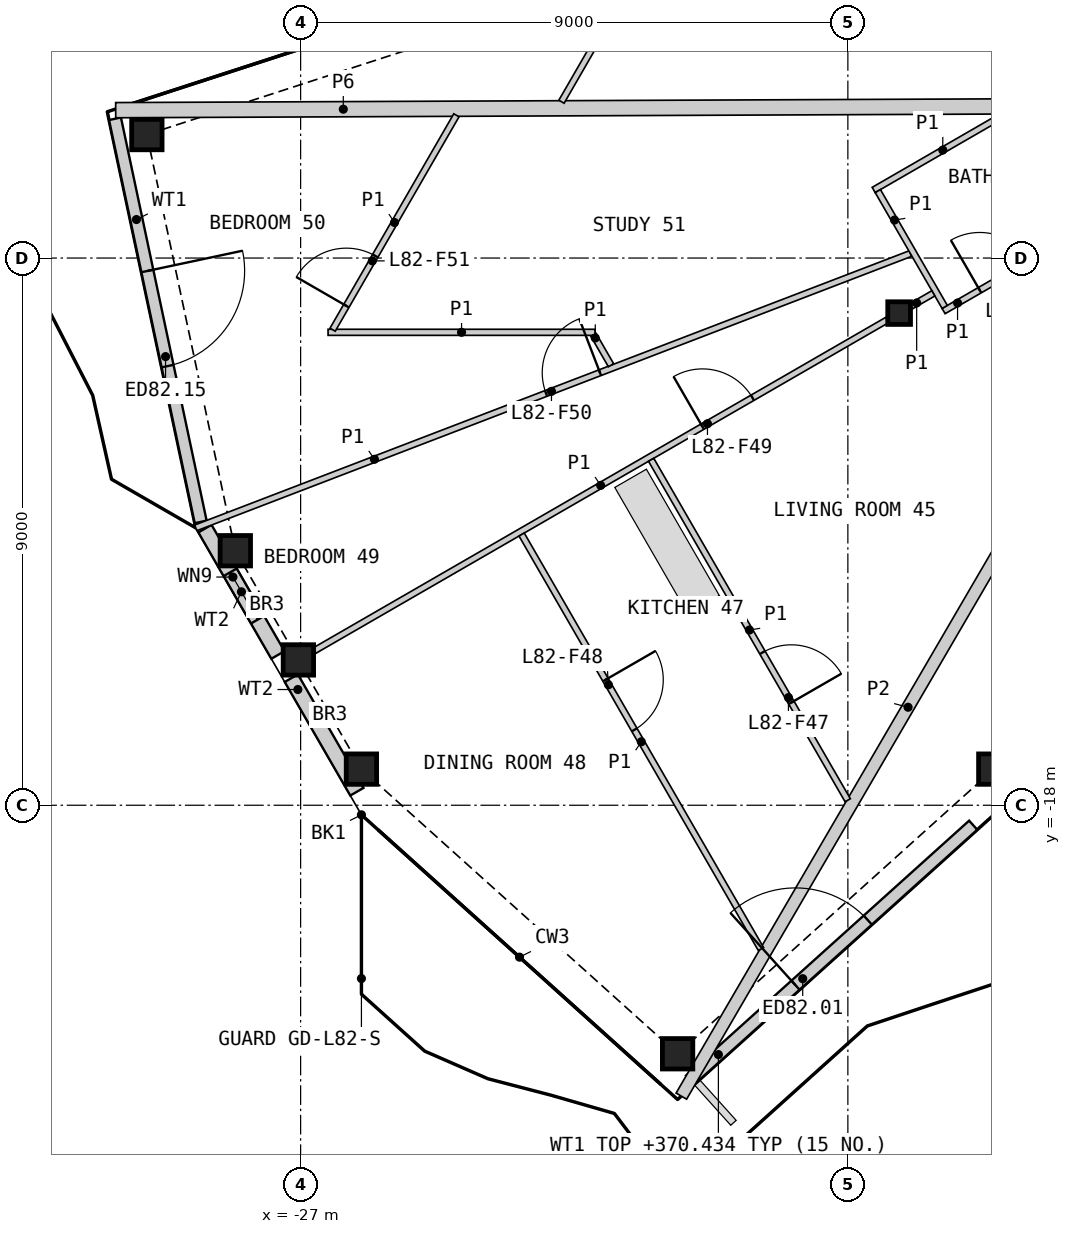
"""IFC4 building model, lengths in metres.
Left out: names, types, materials, properties, quantities, classifications, styles, units other than length and angle.
Written with IfcOpenShell. Run it as: python <this file> out.ifc"""

import sys

from ifc_helpers import new_model, si_unit, direction, frame, frame_2d, origin, origin_2d, place, context, subcontext, project, spatial, rectangle, hollow_rectangle, i_section, extrude, element, fill, save


model = new_model("IFC4")
c1 = context("Model", 3, precision=1e-05, world=origin(), true_north=direction((0.0, 1.0)))
c2 = subcontext(c1, "Body", "Model", "MODEL_VIEW")
j1 = project(units=[si_unit("LENGTHUNIT", "METRE"), si_unit("PLANEANGLEUNIT", "RADIAN")], contexts=[c1])
p1 = place(None, origin())
s1 = spatial("IfcSite", under=j1, at=p1, CompositionType="ELEMENT")
p2 = place(p1, origin())
s2 = spatial("IfcBuilding", under=s1, at=p2, CompositionType="ELEMENT")
p3 = place(p2, frame((0.0, 0.0, 367.8)))
s3 = spatial("IfcBuildingStorey", under=s2, at=p3, CompositionType="ELEMENT", Elevation=367.8)
for number, where, z_axis, x_axis in (
    (1, (-26.0, -17.406, 0.0), (0.0, 0.0, 1.0), (1.0, 0.0, 0.0)),
    (2, (-20.8, -22.088, 0.0), (0.0, 0.0, 1.0), (1.0, 0.0, 0.0)),
    (3, (-15.6, -17.406, 0.0), (0.0, 0.0, 1.0), (1.0, 0.0, 0.0)),
    (4, (-29.529, -6.969, 0.0), (0.0, 0.0, 1.0), (1.0, 0.0, 0.0)),
    (5, (-28.074, -13.814, 0.0), (0.0, 0.0, 1.0), (1.0, 0.0, 0.0)),
    (6, (-27.037, -15.61, 0.0), (0.0, 0.0, 1.0), (1.0, 0.0, 0.0)),
):
    element("IfcColumn", number, at=place(p3, frame(where, z_axis=z_axis, x_axis=x_axis)), inside=s3, PredefinedType="COLUMN", context=c2, shape_type="SweptSolid", body=[
        extrude(hollow_rectangle(XDim=0.5, YDim=0.5, WallThickness=0.03, at=origin_2d()), origin(), (0.0, 0.0, 1.0), 3.4),
    ])
p4 = place(p3, frame((-17.157, -9.906, 0.0), z_axis=(0.0, 0.0, 1.0), x_axis=(1.0, 0.0, 0.0)))
e7 = element("IfcColumn", 7, at=p4, inside=s3, PredefinedType="COLUMN", context=c2, shape_type="SweptSolid", body=[
    extrude(i_section(OverallWidth=0.374, OverallDepth=0.372, WebThickness=0.016, FlangeThickness=0.026, at=origin_2d()), origin(), (0.0, 0.0, 1.0), 3.4),
])
p5 = place(p3, frame((-20.595, -22.52, 0.0), z_axis=(0.0, 0.0, 1.0), x_axis=(0.743137181878, 0.669139095339, 0.0)))
e8 = element("IfcWall", 8, at=p5, inside=s3, PredefinedType="SOLIDWALL", context=c2, shape_type="SweptSolid", body=[
    extrude(rectangle(XDim=6.265, YDim=0.2, at=frame_2d((3.133, 0.0))), origin(), (0.0, 0.0, 1.0), 2.634),
])
p6 = place(p5, frame((2.333, 0.0, 0.0)))
e9 = element("IfcOpeningElement", 9, at=p6, cuts=e8, PredefinedType="OPENING", context=c2, shape_type="SweptSolid", body=[
    extrude(rectangle(XDim=1.6, YDim=2.25, at=frame_2d((0.8, 1.125))), frame((0.0, 0.11, 0.0), z_axis=(0.0, -1.0, 0.0), x_axis=(1.0, 0.0, 0.0)), (0.0, 0.0, 1.0), 0.22),
])
p7 = place(p3, frame((-30.053, -6.709, 0.0), z_axis=(0.0, 0.0, 1.0), x_axis=(0.207917767315, -0.978146309115, 0.0)))
e10 = element("IfcWall", 10, at=p7, inside=s3, PredefinedType="SOLIDWALL", context=c2, shape_type="SweptSolid", body=[
    extrude(rectangle(XDim=6.779, YDim=0.2, at=frame_2d((3.389, 0.0))), origin(), (0.0, 0.0, 1.0), 2.634),
])
p8 = place(p7, frame((2.559, 0.0, 0.0)))
e11 = element("IfcOpeningElement", 11, at=p8, cuts=e10, PredefinedType="OPENING", context=c2, shape_type="SweptSolid", body=[
    extrude(rectangle(XDim=1.6, YDim=2.25, at=frame_2d((0.8, 1.125))), frame((0.0, 0.11, 0.0), z_axis=(0.0, -1.0, 0.0), x_axis=(1.0, 0.0, 0.0)), (0.0, 0.0, 1.0), 0.22),
])
p9 = place(p3, frame((-28.573, -13.45, 0.0), z_axis=(0.0, 0.0, 1.0), x_axis=(0.499969057507, -0.866043267704, 0.0)))
e12 = element("IfcWall", 12, at=p9, inside=s3, PredefinedType="SOLIDWALL", context=c2, shape_type="SweptSolid", body=[
    extrude(rectangle(XDim=2.4, YDim=0.25, at=frame_2d((1.2, 0.0))), origin(), (0.0, 0.0, 1.0), 2.634),
])
p10 = place(p9, frame((0.83, 0.0, 0.6)))
e13 = element("IfcOpeningElement", 13, at=p10, cuts=e12, PredefinedType="OPENING", context=c2, shape_type="SweptSolid", body=[
    extrude(rectangle(XDim=0.9, YDim=1.8, at=frame_2d((0.45, 0.9))), frame((0.0, 0.135, 0.0), z_axis=(0.0, -1.0, 0.0), x_axis=(1.0, 0.0, 0.0)), (0.0, 0.0, 1.0), 0.27),
])
p11 = place(p3, frame((-27.153, -15.91, 0.0), z_axis=(0.0, 0.0, 1.0), x_axis=(0.50000982419, -0.866019731711, 0.0)))
e14 = element("IfcWall", 14, at=p11, inside=s3, PredefinedType="SOLIDWALL", context=c2, shape_type="SweptSolid", body=[
    extrude(rectangle(XDim=2.157, YDim=0.25, at=frame_2d((1.079, 0.0))), origin(), (0.0, 0.0, 1.0), 2.634),
])
p12 = place(p3, frame((-30.041, -6.568, 0.0), z_axis=(0.0, 0.0, 1.0), x_axis=(0.999991150877, 0.004206918925, 0.0)))
e15 = element("IfcWall", 15, at=p12, inside=s3, PredefinedType="PARTITIONING", context=c2, shape_type="SweptSolid", body=[
    extrude(rectangle(XDim=14.973, YDim=0.25, at=frame_2d((7.486, 0.0))), origin(), (0.0, 0.0, 1.0), 2.33),
])
p13 = place(p3, frame((-20.739, -22.784, 0.0), z_axis=(0.0, 0.0, 1.0), x_axis=(0.50362599185, 0.863921790635, 0.0)))
e16 = element("IfcWall", 16, at=p13, inside=s3, PredefinedType="PARTITIONING", context=c2, shape_type="SweptSolid", body=[
    extrude(rectangle(XDim=14.807, YDim=0.2, at=frame_2d((7.404, 0.0))), origin(), (0.0, 0.0, 1.0), 2.33),
])
p14 = place(p3, frame((-28.725, -13.438, 0.0), z_axis=(0.0, 0.0, 1.0), x_axis=(0.933580312145, 0.358368247444, 0.0)))
e17 = element("IfcWall", 17, at=p14, inside=s3, PredefinedType="PARTITIONING", context=c2, shape_type="SweptSolid", body=[
    extrude(rectangle(XDim=12.59, YDim=0.1, at=frame_2d((6.295, 0.0))), origin(), (0.0, 0.0, 1.0), 2.33),
])
p15 = place(p14, frame((6.171, 0.0, 0.0)))
e18 = element("IfcOpeningElement", 18, at=p15, cuts=e17, PredefinedType="OPENING", context=c2, shape_type="SweptSolid", body=[
    extrude(rectangle(XDim=0.95, YDim=2.1, at=frame_2d((0.475, 1.05))), frame((0.0, 0.06, 0.0), z_axis=(0.0, -1.0, 0.0), x_axis=(1.0, 0.0, 0.0)), (0.0, 0.0, 1.0), 0.12),
])
p16 = place(p3, frame((-26.777, -15.46, 0.0), z_axis=(0.0, 0.0, 1.0), x_axis=(0.866019680922, 0.500009912158, 0.0)))
e19 = element("IfcWall", 19, at=p16, inside=s3, PredefinedType="PARTITIONING", context=c2, shape_type="SweptSolid", body=[
    extrude(rectangle(XDim=10.881, YDim=0.1, at=frame_2d((5.44, 0.0))), origin(), (0.0, 0.0, 1.0), 2.33),
])
p17 = place(p16, frame((7.373, 0.0, 0.0)))
e20 = element("IfcOpeningElement", 20, at=p17, cuts=e19, PredefinedType="OPENING", context=c2, shape_type="SweptSolid", body=[
    extrude(rectangle(XDim=0.95, YDim=2.1, at=frame_2d((0.475, 1.05))), frame((0.0, 0.06, 0.0), z_axis=(0.0, -1.0, 0.0), x_axis=(1.0, 0.0, 0.0)), (0.0, 0.0, 1.0), 0.12),
])
p18 = place(p3, frame((-23.365, -13.548, 0.0), z_axis=(0.0, 0.0, 1.0), x_axis=(0.500011483804, -0.866018773506, 0.0)))
e21 = element("IfcWall", 21, at=p18, inside=s3, PredefinedType="PARTITIONING", context=c2, shape_type="SweptSolid", body=[
    extrude(rectangle(XDim=7.872, YDim=0.1, at=frame_2d((3.936, 0.0))), origin(), (0.0, 0.0, 1.0), 2.33),
])
p19 = place(p18, frame((2.759, 0.0, 0.0)))
e22 = element("IfcOpeningElement", 22, at=p19, cuts=e21, PredefinedType="OPENING", context=c2, shape_type="SweptSolid", body=[
    extrude(rectangle(XDim=0.95, YDim=2.1, at=frame_2d((0.475, 1.05))), frame((0.0, 0.06, 0.0), z_axis=(0.0, -1.0, 0.0), x_axis=(1.0, 0.0, 0.0)), (0.0, 0.0, 1.0), 0.12),
])
p20 = place(p3, frame((-22.71, -6.429, 0.0), z_axis=(0.0, 0.0, 1.0), x_axis=(0.499984737558, 0.86603421538, 0.0)))
e23 = element("IfcWall", 23, at=p20, inside=s3, PredefinedType="PARTITIONING", context=c2, shape_type="SweptSolid", body=[
    extrude(rectangle(XDim=6.473, YDim=0.1, at=frame_2d((3.236, 0.0))), origin(), (0.0, 0.0, 1.0), 2.33),
])
p21 = place(p20, frame((3.063, 0.0, 0.0)))
e24 = element("IfcOpeningElement", 24, at=p21, cuts=e23, PredefinedType="OPENING", context=c2, shape_type="SweptSolid", body=[
    extrude(rectangle(XDim=0.95, YDim=2.1, at=frame_2d((0.475, 1.05))), frame((0.0, 0.06, 0.0), z_axis=(0.0, -1.0, 0.0), x_axis=(1.0, 0.0, 0.0)), (0.0, 0.0, 1.0), 0.12),
])
p22 = place(p3, frame((-21.235, -12.318, 0.0), z_axis=(0.0, 0.0, 1.0), x_axis=(0.500008973052, -0.866020223129, 0.0)))
e25 = element("IfcWall", 25, at=p22, inside=s3, PredefinedType="PARTITIONING", context=c2, shape_type="SweptSolid", body=[
    extrude(rectangle(XDim=6.466, YDim=0.1, at=frame_2d((3.233, 0.0))), origin(), (0.0, 0.0, 1.0), 2.33),
])
p23 = place(p22, frame((3.661, 0.0, 0.0)))
e26 = element("IfcOpeningElement", 26, at=p23, cuts=e25, PredefinedType="OPENING", context=c2, shape_type="SweptSolid", body=[
    extrude(rectangle(XDim=0.95, YDim=2.1, at=frame_2d((0.475, 1.05))), frame((0.0, 0.06, 0.0), z_axis=(0.0, -1.0, 0.0), x_axis=(1.0, 0.0, 0.0)), (0.0, 0.0, 1.0), 0.12),
])
p24 = place(p3, frame((-26.549, -10.222, 0.0), z_axis=(0.0, 0.0, 1.0), x_axis=(1.0, 0.0, 0.0)))
e27 = element("IfcWall", 27, at=p24, inside=s3, PredefinedType="PARTITIONING", context=c2, shape_type="SweptSolid", body=[
    extrude(rectangle(XDim=4.391, YDim=0.1, at=frame_2d((2.195, 0.0))), origin(), (0.0, 0.0, 1.0), 2.33),
])
p25 = place(p3, frame((-26.474, -10.178, 0.0), z_axis=(0.0, 0.0, 1.0), x_axis=(0.499995835917, 0.866027807905, 0.0)))
e28 = element("IfcWall", 28, at=p25, inside=s3, PredefinedType="PARTITIONING", context=c2, shape_type="SweptSolid", body=[
    extrude(rectangle(XDim=4.071, YDim=0.1, at=frame_2d((2.036, 0.0))), origin(), (0.0, 0.0, 1.0), 2.33),
])
p26 = place(p25, frame((0.452, 0.0, 0.0)))
e29 = element("IfcOpeningElement", 29, at=p26, cuts=e28, PredefinedType="OPENING", context=c2, shape_type="SweptSolid", body=[
    extrude(rectangle(XDim=0.95, YDim=2.1, at=frame_2d((0.475, 1.05))), frame((0.0, 0.06, 0.0), z_axis=(0.0, -1.0, 0.0), x_axis=(1.0, 0.0, 0.0)), (0.0, 0.0, 1.0), 0.12),
])
p27 = place(p3, frame((-17.575, -7.881, 0.0), z_axis=(0.0, 0.0, 1.0), x_axis=(0.866013657776, 0.500020344131, 0.0)))
e30 = element("IfcWall", 30, at=p27, inside=s3, PredefinedType="PARTITIONING", context=c2, shape_type="SweptSolid", body=[
    extrude(rectangle(XDim=2.625, YDim=0.1, at=frame_2d((1.312, 0.0))), origin(), (0.0, 0.0, 1.0), 2.33),
])
p28 = place(p3, frame((-16.426, -9.872, 0.0), z_axis=(0.0, 0.0, 1.0), x_axis=(0.866029095148, 0.499993606316, 0.0)))
e31 = element("IfcWall", 31, at=p28, inside=s3, PredefinedType="PARTITIONING", context=c2, shape_type="SweptSolid", body=[
    extrude(rectangle(XDim=2.65, YDim=0.1, at=frame_2d((1.325, 0.0))), origin(), (0.0, 0.0, 1.0), 2.33),
])
p29 = place(p28, frame((0.686, 0.0, 0.0)))
e32 = element("IfcOpeningElement", 32, at=p29, cuts=e31, PredefinedType="OPENING", context=c2, shape_type="SweptSolid", body=[
    extrude(rectangle(XDim=0.95, YDim=2.1, at=frame_2d((0.475, 1.05))), frame((0.0, 0.06, 0.0), z_axis=(0.0, -1.0, 0.0), x_axis=(1.0, 0.0, 0.0)), (0.0, 0.0, 1.0), 0.12),
])
p30 = place(p3, frame((-17.507, -7.899, 0.0), z_axis=(0.0, 0.0, 1.0), x_axis=(0.499946605688, -0.86605622881, 0.0)))
e33 = element("IfcWall", 33, at=p30, inside=s3, PredefinedType="PARTITIONING", context=c2, shape_type="SweptSolid", body=[
    extrude(rectangle(XDim=2.2, YDim=0.1, at=frame_2d((1.1, 0.0))), origin(), (0.0, 0.0, 1.0), 2.33),
])
p31 = place(p3, frame((-22.183, -10.265, 0.0), z_axis=(0.0, 0.0, 1.0), x_axis=(0.500016142392, -0.86601608377, 0.0)))
e34 = element("IfcWall", 34, at=p31, inside=s3, PredefinedType="PARTITIONING", context=c2, shape_type="SweptSolid", body=[
    extrude(rectangle(XDim=0.576, YDim=0.1, at=frame_2d((0.288, 0.0))), origin(), (0.0, 0.0, 1.0), 2.33),
])
p32 = place(p3, frame((-16.96, -9.792, 0.0), z_axis=(0.0, 0.0, 1.0), x_axis=(0.866137484628, 0.499805820016, 0.0)))
e35 = element("IfcWall", 35, at=p32, inside=s3, PredefinedType="PARTITIONING", context=c2, shape_type="SweptSolid", body=[
    extrude(rectangle(XDim=0.423, YDim=0.1, at=frame_2d((0.211, 0.0))), origin(), (0.0, 0.0, 1.0), 2.33),
])
p33 = place(p6, origin())
e36 = element("IfcDoor", 36, at=p33, inside=s3, OperationType="DOUBLE_DOOR_SINGLE_SWING", PredefinedType="DOOR", context=c2, shape_type="SweptSolid", body=[
    extrude(rectangle(XDim=1.6, YDim=2.25, at=frame_2d((0.8, 1.125))), frame((0.0, 0.025, 0.0), z_axis=(0.0, -1.0, 0.0), x_axis=(1.0, 0.0, 0.0)), (0.0, 0.0, 1.0), 0.05),
])
fill(e9, e36)
p34 = place(p8, origin())
e37 = element("IfcDoor", 37, at=p34, inside=s3, OperationType="DOUBLE_DOOR_SINGLE_SWING", PredefinedType="DOOR", context=c2, shape_type="SweptSolid", body=[
    extrude(rectangle(XDim=1.6, YDim=2.25, at=frame_2d((0.8, 1.125))), frame((0.0, 0.025, 0.0), z_axis=(0.0, -1.0, 0.0), x_axis=(1.0, 0.0, 0.0)), (0.0, 0.0, 1.0), 0.05),
])
fill(e11, e37)
p35 = place(p10, origin())
e38 = element("IfcWindow", 38, at=p35, inside=s3, PartitioningType="SINGLE_PANEL", PredefinedType="WINDOW", context=c2, shape_type="SweptSolid", body=[
    extrude(rectangle(XDim=0.9, YDim=1.8, at=frame_2d((0.45, 0.9))), frame((0.0, 0.03, 0.0), z_axis=(0.0, -1.0, 0.0), x_axis=(1.0, 0.0, 0.0)), (0.0, 0.0, 1.0), 0.06),
])
fill(e13, e38)
p36 = place(p29, origin())
e39 = element("IfcDoor", 39, at=p36, inside=s3, OperationType="SINGLE_SWING_LEFT", PredefinedType="DOOR", context=c2, shape_type="SweptSolid", body=[
    extrude(rectangle(XDim=0.95, YDim=2.1, at=frame_2d((0.475, 1.05))), frame((0.0, 0.025, 0.0), z_axis=(0.0, -1.0, 0.0), x_axis=(1.0, 0.0, 0.0)), (0.0, 0.0, 1.0), 0.05),
])
fill(e32, e39)
p37 = place(p23, origin())
e40 = element("IfcDoor", 40, at=p37, inside=s3, OperationType="SINGLE_SWING_RIGHT", PredefinedType="DOOR", context=c2, shape_type="SweptSolid", body=[
    extrude(rectangle(XDim=0.95, YDim=2.1, at=frame_2d((0.475, 1.05))), frame((0.0, 0.025, 0.0), z_axis=(0.0, -1.0, 0.0), x_axis=(1.0, 0.0, 0.0)), (0.0, 0.0, 1.0), 0.05),
])
fill(e26, e40)
p38 = place(p19, origin())
e41 = element("IfcDoor", 41, at=p38, inside=s3, OperationType="SINGLE_SWING_LEFT", PredefinedType="DOOR", context=c2, shape_type="SweptSolid", body=[
    extrude(rectangle(XDim=0.95, YDim=2.1, at=frame_2d((0.475, 1.05))), frame((0.0, 0.025, 0.0), z_axis=(0.0, -1.0, 0.0), x_axis=(1.0, 0.0, 0.0)), (0.0, 0.0, 1.0), 0.05),
])
fill(e22, e41)
p39 = place(p17, origin())
e42 = element("IfcDoor", 42, at=p39, inside=s3, OperationType="SINGLE_SWING_LEFT", PredefinedType="DOOR", context=c2, shape_type="SweptSolid", body=[
    extrude(rectangle(XDim=0.95, YDim=2.1, at=frame_2d((0.475, 1.05))), frame((0.0, 0.025, 0.0), z_axis=(0.0, -1.0, 0.0), x_axis=(1.0, 0.0, 0.0)), (0.0, 0.0, 1.0), 0.05),
])
fill(e20, e42)
p40 = place(p15, origin())
e43 = element("IfcDoor", 43, at=p40, inside=s3, OperationType="SINGLE_SWING_RIGHT", PredefinedType="DOOR", context=c2, shape_type="SweptSolid", body=[
    extrude(rectangle(XDim=0.95, YDim=2.1, at=frame_2d((0.475, 1.05))), frame((0.0, 0.025, 0.0), z_axis=(0.0, -1.0, 0.0), x_axis=(1.0, 0.0, 0.0)), (0.0, 0.0, 1.0), 0.05),
])
fill(e18, e43)
p41 = place(p26, origin())
e44 = element("IfcDoor", 44, at=p41, inside=s3, OperationType="SINGLE_SWING_LEFT", PredefinedType="DOOR", context=c2, shape_type="SweptSolid", body=[
    extrude(rectangle(XDim=0.95, YDim=2.1, at=frame_2d((0.475, 1.05))), frame((0.0, 0.025, 0.0), z_axis=(0.0, -1.0, 0.0), x_axis=(1.0, 0.0, 0.0)), (0.0, 0.0, 1.0), 0.05),
])
fill(e29, e44)
save(model, sys.argv[1])
